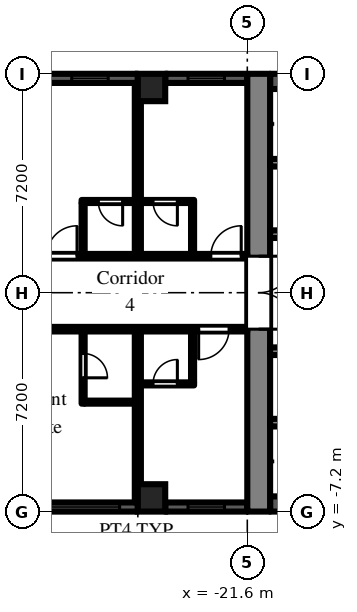
"""IFC4 building model, lengths in metres.
Left out: names, types, materials, properties, quantities, classifications, styles, units other than length and angle.
Written with IfcOpenShell. Run it as: python <this file> out.ifc"""

import sys

from ifc_helpers import new_model, si_unit, direction, frame, frame_2d, origin, origin_2d, place, context, subcontext, project, spatial, rectangle, extrude, element, fill, save


model = new_model("IFC4")
c1 = context("Model", 3, precision=1e-05, world=origin(), true_north=direction((0.0, 1.0)))
c2 = subcontext(c1, "Body", "Model", "MODEL_VIEW")
j1 = project(units=[si_unit("LENGTHUNIT", "METRE"), si_unit("PLANEANGLEUNIT", "RADIAN")], contexts=[c1])
p1 = place(None, origin())
s1 = spatial("IfcSite", under=j1, at=p1, CompositionType="ELEMENT")
p2 = place(p1, origin())
s2 = spatial("IfcBuilding", under=s1, at=p2, CompositionType="ELEMENT")
p3 = place(p2, frame((0.0, 0.0, 44.7)))
s3 = spatial("IfcBuildingStorey", under=s2, at=p3, CompositionType="ELEMENT", Elevation=44.7)
for number, where, z_axis, x_axis in (
    (1, (-24.75, -6.75, 0.0), (0.0, 0.0, 1.0), (1.0, 0.0, 0.0)),
    (2, (-24.75, 6.75, 0.0), (0.0, 0.0, 1.0), (1.0, 0.0, 0.0)),
):
    element("IfcColumn", number, at=place(p3, frame(where, z_axis=z_axis, x_axis=x_axis)), inside=s3, PredefinedType="COLUMN", context=c2, shape_type="SweptSolid", body=[
        extrude(rectangle(XDim=0.9, YDim=0.9, at=origin_2d()), origin(), (0.0, 0.0, 1.0), 3.0),
    ])
p4 = place(p3, frame((-21.6, 7.05, 0.0), z_axis=(0.0, 0.0, 1.0), x_axis=(-1.0, 0.0, 0.0)))
e3 = element("IfcWall", 3, at=p4, inside=s3, PredefinedType="SOLIDWALL", context=c2, shape_type="SweptSolid", body=[
    extrude(rectangle(XDim=2.7, YDim=0.3, at=frame_2d((1.35, 0.0))), origin(), (0.0, 0.0, 1.0), 2.1),
])
p5 = place(p4, frame((0.75, 0.0, 0.2)))
e4 = element("IfcOpeningElement", 4, at=p5, cuts=e3, PredefinedType="OPENING", context=c2, shape_type="SweptSolid", body=[
    extrude(rectangle(XDim=1.2, YDim=1.85, at=frame_2d((0.6, 0.925))), frame((0.0, 0.16, 0.0), z_axis=(0.0, -1.0, 0.0), x_axis=(1.0, 0.0, 0.0)), (0.0, 0.0, 1.0), 0.32),
])
p6 = place(p3, frame((-25.2, 7.05, 0.0), z_axis=(0.0, 0.0, 1.0), x_axis=(-1.0, 0.0, 0.0)))
e5 = element("IfcWall", 5, at=p6, inside=s3, PredefinedType="SOLIDWALL", context=c2, shape_type="SweptSolid", body=[
    extrude(rectangle(XDim=3.15, YDim=0.3, at=frame_2d((1.575, 0.0))), origin(), (0.0, 0.0, 1.0), 2.1),
])
p7 = place(p6, frame((0.975, 0.0, 0.2)))
e6 = element("IfcOpeningElement", 6, at=p7, cuts=e5, PredefinedType="OPENING", context=c2, shape_type="SweptSolid", body=[
    extrude(rectangle(XDim=1.2, YDim=1.85, at=frame_2d((0.6, 0.925))), frame((0.0, 0.16, 0.0), z_axis=(0.0, -1.0, 0.0), x_axis=(1.0, 0.0, 0.0)), (0.0, 0.0, 1.0), 0.32),
])
p8 = place(p3, frame((-28.35, -7.05, 0.0), z_axis=(0.0, 0.0, 1.0), x_axis=(1.0, 0.0, 0.0)))
e7 = element("IfcWall", 7, at=p8, inside=s3, PredefinedType="SOLIDWALL", context=c2, shape_type="SweptSolid", body=[
    extrude(rectangle(XDim=3.15, YDim=0.3, at=frame_2d((1.575, 0.0))), origin(), (0.0, 0.0, 1.0), 2.1),
])
p9 = place(p8, frame((0.15, 0.0, 0.2)))
e8 = element("IfcOpeningElement", 8, at=p9, cuts=e7, PredefinedType="OPENING", context=c2, shape_type="SweptSolid", body=[
    extrude(rectangle(XDim=2.4, YDim=1.85, at=frame_2d((1.2, 0.925))), frame((0.0, 0.16, 0.0), z_axis=(0.0, -1.0, 0.0), x_axis=(1.0, 0.0, 0.0)), (0.0, 0.0, 1.0), 0.32),
])
p10 = place(p3, frame((-24.3, -7.05, 0.0), z_axis=(0.0, 0.0, 1.0), x_axis=(1.0, 0.0, 0.0)))
e9 = element("IfcWall", 9, at=p10, inside=s3, PredefinedType="SOLIDWALL", context=c2, shape_type="SweptSolid", body=[
    extrude(rectangle(XDim=2.7, YDim=0.3, at=frame_2d((1.35, 0.0))), origin(), (0.0, 0.0, 1.0), 2.1),
])
p11 = place(p10, frame((0.75, 0.0, 0.2)))
e10 = element("IfcOpeningElement", 10, at=p11, cuts=e9, PredefinedType="OPENING", context=c2, shape_type="SweptSolid", body=[
    extrude(rectangle(XDim=1.2, YDim=1.85, at=frame_2d((0.6, 0.925))), frame((0.0, 0.16, 0.0), z_axis=(0.0, -1.0, 0.0), x_axis=(1.0, 0.0, 0.0)), (0.0, 0.0, 1.0), 0.32),
])
p12 = place(p3, frame((-21.225, -7.2, 0.0), z_axis=(0.0, 0.0, 1.0), x_axis=(0.0, 1.0, 0.0)))
e11 = element("IfcWall", 11, at=p12, inside=s3, PredefinedType="SHEAR", context=c2, shape_type="SweptSolid", body=[
    extrude(rectangle(XDim=14.4, YDim=0.75, at=frame_2d((7.2, 0.0))), origin(), (0.0, 0.0, 1.0), 2.575),
])
p13 = place(p12, frame((6.0, 0.0, 0.0)))
e12 = element("IfcOpeningElement", 12, at=p13, cuts=e11, PredefinedType="OPENING", context=c2, shape_type="SweptSolid", body=[
    extrude(rectangle(XDim=2.4, YDim=2.2, at=frame_2d((1.2, 1.1))), frame((0.0, 0.385, 0.0), z_axis=(0.0, -1.0, 0.0), x_axis=(1.0, 0.0, 0.0)), (0.0, 0.0, 1.0), 0.77),
])
p14 = place(p3, frame((-7.9, 6.95, 0.0), z_axis=(0.0, 0.0, 1.0), x_axis=(-1.0, 0.0, 0.0)))
e13 = element("IfcWall", 13, at=p14, inside=s3, PredefinedType="SHEAR", context=c2, shape_type="SweptSolid", body=[
    extrude(rectangle(XDim=12.95, YDim=0.5, at=frame_2d((6.475, 0.0))), origin(), (0.0, 0.0, 1.0), 2.575),
])
p15 = place(p3, frame((-7.9, 1.925, 0.0), z_axis=(0.0, 0.0, 1.0), x_axis=(-1.0, 0.0, 0.0)))
e14 = element("IfcWall", 14, at=p15, inside=s3, PredefinedType="SHEAR", context=c2, shape_type="SweptSolid", body=[
    extrude(rectangle(XDim=12.95, YDim=0.25, at=frame_2d((6.475, 0.0))), origin(), (0.0, 0.0, 1.0), 2.575),
])
p16 = place(p15, frame((0.525, 0.0, 0.0)))
e15 = element("IfcOpeningElement", 15, at=p16, cuts=e14, PredefinedType="OPENING", context=c2, shape_type="SweptSolid", body=[
    extrude(rectangle(XDim=0.9, YDim=2.1, at=frame_2d((0.45, 1.05))), frame((0.0, 0.135, 0.0), z_axis=(0.0, -1.0, 0.0), x_axis=(1.0, 0.0, 0.0)), (0.0, 0.0, 1.0), 0.27),
])
p17 = place(p15, frame((2.625, 0.0, 0.0)))
e16 = element("IfcOpeningElement", 16, at=p17, cuts=e14, PredefinedType="OPENING", context=c2, shape_type="SweptSolid", body=[
    extrude(rectangle(XDim=1.1, YDim=2.1, at=frame_2d((0.55, 1.05))), frame((0.0, 0.135, 0.0), z_axis=(0.0, -1.0, 0.0), x_axis=(1.0, 0.0, 0.0)), (0.0, 0.0, 1.0), 0.27),
])
p18 = place(p15, frame((4.925, 0.0, 0.0)))
e17 = element("IfcOpeningElement", 17, at=p18, cuts=e14, PredefinedType="OPENING", context=c2, shape_type="SweptSolid", body=[
    extrude(rectangle(XDim=0.9, YDim=2.1, at=frame_2d((0.45, 1.05))), frame((0.0, 0.135, 0.0), z_axis=(0.0, -1.0, 0.0), x_axis=(1.0, 0.0, 0.0)), (0.0, 0.0, 1.0), 0.27),
])
p19 = place(p15, frame((8.225, 0.0, 0.0)))
e18 = element("IfcOpeningElement", 18, at=p19, cuts=e14, PredefinedType="OPENING", context=c2, shape_type="SweptSolid", body=[
    extrude(rectangle(XDim=0.9, YDim=2.1, at=frame_2d((0.45, 1.05))), frame((0.0, 0.135, 0.0), z_axis=(0.0, -1.0, 0.0), x_axis=(1.0, 0.0, 0.0)), (0.0, 0.0, 1.0), 0.27),
])
p20 = place(p3, frame((-12.3, 4.275, 0.0), z_axis=(0.0, 0.0, 1.0), x_axis=(-1.0, 0.0, 0.0)))
e19 = element("IfcWall", 19, at=p20, inside=s3, PredefinedType="SHEAR", context=c2, shape_type="SweptSolid", body=[
    extrude(rectangle(XDim=8.55, YDim=0.25, at=frame_2d((4.275, 0.0))), origin(), (0.0, 0.0, 1.0), 2.575),
])
p21 = place(p3, frame((-7.9, -6.95, 0.0), z_axis=(0.0, 0.0, 1.0), x_axis=(-1.0, 0.0, 0.0)))
e20 = element("IfcWall", 20, at=p21, inside=s3, PredefinedType="SHEAR", context=c2, shape_type="SweptSolid", body=[
    extrude(rectangle(XDim=12.95, YDim=0.5, at=frame_2d((6.475, 0.0))), origin(), (0.0, 0.0, 1.0), 2.575),
])
p22 = place(p3, frame((-7.9, -1.925, 0.0), z_axis=(0.0, 0.0, 1.0), x_axis=(-1.0, 0.0, 0.0)))
e21 = element("IfcWall", 21, at=p22, inside=s3, PredefinedType="SHEAR", context=c2, shape_type="SweptSolid", body=[
    extrude(rectangle(XDim=12.95, YDim=0.25, at=frame_2d((6.475, 0.0))), origin(), (0.0, 0.0, 1.0), 2.575),
])
p23 = place(p22, frame((4.825, 0.0, 0.0)))
e22 = element("IfcOpeningElement", 22, at=p23, cuts=e21, PredefinedType="OPENING", context=c2, shape_type="SweptSolid", body=[
    extrude(rectangle(XDim=1.1, YDim=2.1, at=frame_2d((0.55, 1.05))), frame((0.0, 0.135, 0.0), z_axis=(0.0, -1.0, 0.0), x_axis=(1.0, 0.0, 0.0)), (0.0, 0.0, 1.0), 0.27),
])
p24 = place(p22, frame((7.025, 0.0, 0.0)))
e23 = element("IfcOpeningElement", 23, at=p24, cuts=e21, PredefinedType="OPENING", context=c2, shape_type="SweptSolid", body=[
    extrude(rectangle(XDim=1.1, YDim=2.1, at=frame_2d((0.55, 1.05))), frame((0.0, 0.135, 0.0), z_axis=(0.0, -1.0, 0.0), x_axis=(1.0, 0.0, 0.0)), (0.0, 0.0, 1.0), 0.27),
])
p25 = place(p22, frame((9.225, 0.0, 0.0)))
e24 = element("IfcOpeningElement", 24, at=p25, cuts=e21, PredefinedType="OPENING", context=c2, shape_type="SweptSolid", body=[
    extrude(rectangle(XDim=1.1, YDim=2.1, at=frame_2d((0.55, 1.05))), frame((0.0, 0.135, 0.0), z_axis=(0.0, -1.0, 0.0), x_axis=(1.0, 0.0, 0.0)), (0.0, 0.0, 1.0), 0.27),
])
p26 = place(p22, frame((0.525, 0.0, 0.0)))
e25 = element("IfcOpeningElement", 25, at=p26, cuts=e21, PredefinedType="OPENING", context=c2, shape_type="SweptSolid", body=[
    extrude(rectangle(XDim=0.9, YDim=2.1, at=frame_2d((0.45, 1.05))), frame((0.0, 0.135, 0.0), z_axis=(0.0, -1.0, 0.0), x_axis=(1.0, 0.0, 0.0)), (0.0, 0.0, 1.0), 0.27),
])
p27 = place(p22, frame((2.625, 0.0, 0.0)))
e26 = element("IfcOpeningElement", 26, at=p27, cuts=e21, PredefinedType="OPENING", context=c2, shape_type="SweptSolid", body=[
    extrude(rectangle(XDim=1.1, YDim=2.1, at=frame_2d((0.55, 1.05))), frame((0.0, 0.135, 0.0), z_axis=(0.0, -1.0, 0.0), x_axis=(1.0, 0.0, 0.0)), (0.0, 0.0, 1.0), 0.27),
])
p28 = place(p3, frame((-12.3, -4.275, 0.0), z_axis=(0.0, 0.0, 1.0), x_axis=(-1.0, 0.0, 0.0)))
e27 = element("IfcWall", 27, at=p28, inside=s3, PredefinedType="SHEAR", context=c2, shape_type="SweptSolid", body=[
    extrude(rectangle(XDim=8.55, YDim=0.25, at=frame_2d((4.275, 0.0))), origin(), (0.0, 0.0, 1.0), 2.575),
])
p29 = place(p3, frame((-36.5, -1.2, 0.0), z_axis=(0.0, 0.0, 1.0), x_axis=(1.0, 0.0, 0.0)))
e28 = element("IfcWall", 28, at=p29, inside=s3, PredefinedType="PARTITIONING", context=c2, shape_type="SweptSolid", body=[
    extrude(rectangle(XDim=14.9, YDim=0.15, at=frame_2d((7.45, 0.0))), origin(), (0.0, 0.0, 1.0), 2.575),
])
p30 = place(p29, frame((13.3, 0.0, 0.0)))
e29 = element("IfcOpeningElement", 29, at=p30, cuts=e28, PredefinedType="OPENING", context=c2, shape_type="SweptSolid", body=[
    extrude(rectangle(XDim=1.0, YDim=2.1, at=frame_2d((0.5, 1.05))), frame((0.0, 0.085, 0.0), z_axis=(0.0, -1.0, 0.0), x_axis=(1.0, 0.0, 0.0)), (0.0, 0.0, 1.0), 0.17),
])
p31 = place(p29, frame((4.41, 0.0, 0.0)))
e30 = element("IfcOpeningElement", 30, at=p31, cuts=e28, PredefinedType="OPENING", context=c2, shape_type="SweptSolid", body=[
    extrude(rectangle(XDim=1.0, YDim=2.1, at=frame_2d((0.5, 1.05))), frame((0.0, 0.085, 0.0), z_axis=(0.0, -1.0, 0.0), x_axis=(1.0, 0.0, 0.0)), (0.0, 0.0, 1.0), 0.17),
])
p32 = place(p29, frame((1.15, 0.0, 0.0)))
e31 = element("IfcOpeningElement", 31, at=p32, cuts=e28, PredefinedType="OPENING", context=c2, shape_type="SweptSolid", body=[
    extrude(rectangle(XDim=1.8, YDim=2.1, at=frame_2d((0.9, 1.05))), frame((0.0, 0.085, 0.0), z_axis=(0.0, -1.0, 0.0), x_axis=(1.0, 0.0, 0.0)), (0.0, 0.0, 1.0), 0.17),
])
p33 = place(p3, frame((-36.5, 1.2, 0.0), z_axis=(0.0, 0.0, 1.0), x_axis=(1.0, 0.0, 0.0)))
e32 = element("IfcWall", 32, at=p33, inside=s3, PredefinedType="PARTITIONING", context=c2, shape_type="SweptSolid", body=[
    extrude(rectangle(XDim=14.9, YDim=0.15, at=frame_2d((7.45, 0.0))), origin(), (0.0, 0.0, 1.0), 2.575),
])
p34 = place(p33, frame((13.7, 0.0, 0.0)))
e33 = element("IfcOpeningElement", 33, at=p34, cuts=e32, PredefinedType="OPENING", context=c2, shape_type="SweptSolid", body=[
    extrude(rectangle(XDim=1.0, YDim=2.1, at=frame_2d((0.5, 1.05))), frame((0.0, 0.085, 0.0), z_axis=(0.0, -1.0, 0.0), x_axis=(1.0, 0.0, 0.0)), (0.0, 0.0, 1.0), 0.17),
])
p35 = place(p33, frame((8.3, 0.0, 0.0)))
e34 = element("IfcOpeningElement", 34, at=p35, cuts=e32, PredefinedType="OPENING", context=c2, shape_type="SweptSolid", body=[
    extrude(rectangle(XDim=1.0, YDim=2.1, at=frame_2d((0.5, 1.05))), frame((0.0, 0.085, 0.0), z_axis=(0.0, -1.0, 0.0), x_axis=(1.0, 0.0, 0.0)), (0.0, 0.0, 1.0), 0.17),
])
p36 = place(p33, frame((6.35, 0.0, 0.0)))
e35 = element("IfcOpeningElement", 35, at=p36, cuts=e32, PredefinedType="OPENING", context=c2, shape_type="SweptSolid", body=[
    extrude(rectangle(XDim=0.9, YDim=2.1, at=frame_2d((0.45, 1.05))), frame((0.0, 0.085, 0.0), z_axis=(0.0, -1.0, 0.0), x_axis=(1.0, 0.0, 0.0)), (0.0, 0.0, 1.0), 0.17),
])
p37 = place(p33, frame((4.55, 0.0, 0.0)))
e36 = element("IfcOpeningElement", 36, at=p37, cuts=e32, PredefinedType="OPENING", context=c2, shape_type="SweptSolid", body=[
    extrude(rectangle(XDim=0.9, YDim=2.1, at=frame_2d((0.45, 1.05))), frame((0.0, 0.085, 0.0), z_axis=(0.0, -1.0, 0.0), x_axis=(1.0, 0.0, 0.0)), (0.0, 0.0, 1.0), 0.17),
])
p38 = place(p33, frame((1.15, 0.0, 0.0)))
e37 = element("IfcOpeningElement", 37, at=p38, cuts=e32, PredefinedType="OPENING", context=c2, shape_type="SweptSolid", body=[
    extrude(rectangle(XDim=1.8, YDim=2.1, at=frame_2d((0.9, 1.05))), frame((0.0, 0.085, 0.0), z_axis=(0.0, -1.0, 0.0), x_axis=(1.0, 0.0, 0.0)), (0.0, 0.0, 1.0), 0.17),
])
p39 = place(p3, frame((-27.0, -3.65, 0.0), z_axis=(0.0, 0.0, 1.0), x_axis=(0.0, 1.0, 0.0)))
e38 = element("IfcWall", 38, at=p39, inside=s3, PredefinedType="PARTITIONING", context=c2, shape_type="SweptSolid", body=[
    extrude(rectangle(XDim=2.375, YDim=0.1, at=frame_2d((1.188, 0.0))), origin(), (0.0, 0.0, 1.0), 2.575),
])
p40 = place(p39, frame((0.85, 0.0, 0.0)))
e39 = element("IfcOpeningElement", 39, at=p40, cuts=e38, PredefinedType="OPENING", context=c2, shape_type="SweptSolid", body=[
    extrude(rectangle(XDim=0.8, YDim=2.1, at=frame_2d((0.4, 1.05))), frame((0.0, 0.06, 0.0), z_axis=(0.0, -1.0, 0.0), x_axis=(1.0, 0.0, 0.0)), (0.0, 0.0, 1.0), 0.12),
])
p41 = place(p3, frame((-26.95, -3.6, 0.0), z_axis=(0.0, 0.0, 1.0), x_axis=(1.0, 0.0, 0.0)))
e40 = element("IfcWall", 40, at=p41, inside=s3, PredefinedType="PARTITIONING", context=c2, shape_type="SweptSolid", body=[
    extrude(rectangle(XDim=1.65, YDim=0.1, at=frame_2d((0.825, 0.0))), origin(), (0.0, 0.0, 1.0), 2.575),
])
p42 = place(p3, frame((-27.0, 1.275, 0.0), z_axis=(0.0, 0.0, 1.0), x_axis=(0.0, 1.0, 0.0)))
e41 = element("IfcWall", 41, at=p42, inside=s3, PredefinedType="PARTITIONING", context=c2, shape_type="SweptSolid", body=[
    extrude(rectangle(XDim=1.675, YDim=0.1, at=frame_2d((0.837, 0.0))), origin(), (0.0, 0.0, 1.0), 2.575),
])
p43 = place(p3, frame((-27.05, 3.0, 0.0), z_axis=(0.0, 0.0, 1.0), x_axis=(1.0, 0.0, 0.0)))
e42 = element("IfcWall", 42, at=p43, inside=s3, PredefinedType="PARTITIONING", context=c2, shape_type="SweptSolid", body=[
    extrude(rectangle(XDim=3.7, YDim=0.1, at=frame_2d((1.85, 0.0))), origin(), (0.0, 0.0, 1.0), 2.575),
])
p44 = place(p43, frame((2.35, 0.0, 0.0)))
e43 = element("IfcOpeningElement", 43, at=p44, cuts=e42, PredefinedType="OPENING", context=c2, shape_type="SweptSolid", body=[
    extrude(rectangle(XDim=0.8, YDim=2.1, at=frame_2d((0.4, 1.05))), frame((0.0, 0.06, 0.0), z_axis=(0.0, -1.0, 0.0), x_axis=(1.0, 0.0, 0.0)), (0.0, 0.0, 1.0), 0.12),
])
p45 = place(p43, frame((0.55, 0.0, 0.0)))
e44 = element("IfcOpeningElement", 44, at=p45, cuts=e42, PredefinedType="OPENING", context=c2, shape_type="SweptSolid", body=[
    extrude(rectangle(XDim=0.8, YDim=2.1, at=frame_2d((0.4, 1.05))), frame((0.0, 0.06, 0.0), z_axis=(0.0, -1.0, 0.0), x_axis=(1.0, 0.0, 0.0)), (0.0, 0.0, 1.0), 0.12),
])
p46 = place(p3, frame((-25.2, -6.9, 0.0), z_axis=(0.0, 0.0, 1.0), x_axis=(0.0, 1.0, 0.0)))
e45 = element("IfcWall", 45, at=p46, inside=s3, PredefinedType="PARTITIONING", context=c2, shape_type="SweptSolid", body=[
    extrude(rectangle(XDim=5.625, YDim=0.2, at=frame_2d((2.812, 0.0))), origin(), (0.0, 0.0, 1.0), 2.575),
])
p47 = place(p3, frame((-25.1, -3.0, 0.0), z_axis=(0.0, 0.0, 1.0), x_axis=(1.0, 0.0, 0.0)))
e46 = element("IfcWall", 46, at=p47, inside=s3, PredefinedType="PARTITIONING", context=c2, shape_type="SweptSolid", body=[
    extrude(rectangle(XDim=1.75, YDim=0.1, at=frame_2d((0.875, 0.0))), origin(), (0.0, 0.0, 1.0), 2.575),
])
p48 = place(p47, frame((0.4, 0.0, 0.0)))
e47 = element("IfcOpeningElement", 47, at=p48, cuts=e46, PredefinedType="OPENING", context=c2, shape_type="SweptSolid", body=[
    extrude(rectangle(XDim=0.8, YDim=2.1, at=frame_2d((0.4, 1.05))), frame((0.0, 0.06, 0.0), z_axis=(0.0, -1.0, 0.0), x_axis=(1.0, 0.0, 0.0)), (0.0, 0.0, 1.0), 0.12),
])
p49 = place(p3, frame((-25.2, 1.275, 0.0), z_axis=(0.0, 0.0, 1.0), x_axis=(0.0, 1.0, 0.0)))
e48 = element("IfcWall", 48, at=p49, inside=s3, PredefinedType="PARTITIONING", context=c2, shape_type="SweptSolid", body=[
    extrude(rectangle(XDim=5.625, YDim=0.2, at=frame_2d((2.812, 0.0))), origin(), (0.0, 0.0, 1.0), 2.575),
])
for number, where, z_axis, x_axis in (
    (49, (-23.4, -2.95, 0.0), (0.0, 0.0, 1.0), (0.0, 1.0, 0.0)),
    (50, (-23.4, 1.275, 0.0), (0.0, 0.0, 1.0), (0.0, 1.0, 0.0)),
):
    element("IfcWall", number, at=place(p3, frame(where, z_axis=z_axis, x_axis=x_axis)), inside=s3, PredefinedType="PARTITIONING", context=c2, shape_type="SweptSolid", body=[
        extrude(rectangle(XDim=1.675, YDim=0.1, at=frame_2d((0.837, 0.0))), origin(), (0.0, 0.0, 1.0), 2.575),
    ])
p50 = place(p5, origin())
e51 = element("IfcWindow", 51, at=p50, inside=s3, PartitioningType="SINGLE_PANEL", PredefinedType="WINDOW", context=c2, shape_type="SweptSolid", body=[
    extrude(rectangle(XDim=1.2, YDim=1.85, at=frame_2d((0.6, 0.925))), frame((0.0, 0.03, 0.0), z_axis=(0.0, -1.0, 0.0), x_axis=(1.0, 0.0, 0.0)), (0.0, 0.0, 1.0), 0.06),
])
fill(e4, e51)
p51 = place(p7, origin())
e52 = element("IfcWindow", 52, at=p51, inside=s3, PartitioningType="SINGLE_PANEL", PredefinedType="WINDOW", context=c2, shape_type="SweptSolid", body=[
    extrude(rectangle(XDim=1.2, YDim=1.85, at=frame_2d((0.6, 0.925))), frame((0.0, 0.03, 0.0), z_axis=(0.0, -1.0, 0.0), x_axis=(1.0, 0.0, 0.0)), (0.0, 0.0, 1.0), 0.06),
])
fill(e6, e52)
p52 = place(p9, origin())
e53 = element("IfcWindow", 53, at=p52, inside=s3, PartitioningType="SINGLE_PANEL", PredefinedType="WINDOW", context=c2, shape_type="SweptSolid", body=[
    extrude(rectangle(XDim=2.4, YDim=1.85, at=frame_2d((1.2, 0.925))), frame((0.0, 0.03, 0.0), z_axis=(0.0, -1.0, 0.0), x_axis=(1.0, 0.0, 0.0)), (0.0, 0.0, 1.0), 0.06),
])
fill(e8, e53)
p53 = place(p11, origin())
e54 = element("IfcWindow", 54, at=p53, inside=s3, PartitioningType="SINGLE_PANEL", PredefinedType="WINDOW", context=c2, shape_type="SweptSolid", body=[
    extrude(rectangle(XDim=1.2, YDim=1.85, at=frame_2d((0.6, 0.925))), frame((0.0, 0.03, 0.0), z_axis=(0.0, -1.0, 0.0), x_axis=(1.0, 0.0, 0.0)), (0.0, 0.0, 1.0), 0.06),
])
fill(e10, e54)
p54 = place(p13, frame((2.4, 0.0, 0.0), z_axis=(0.0, 0.0, 1.0), x_axis=(-1.0, 0.0, 0.0)))
e55 = element("IfcDoor", 55, at=p54, inside=s3, OperationType="DOUBLE_DOOR_DOUBLE_SWING", PredefinedType="DOOR", context=c2, shape_type="SweptSolid", body=[
    extrude(rectangle(XDim=2.4, YDim=2.2, at=frame_2d((1.2, 1.1))), frame((0.0, 0.025, 0.0), z_axis=(0.0, -1.0, 0.0), x_axis=(1.0, 0.0, 0.0)), (0.0, 0.0, 1.0), 0.05),
])
fill(e12, e55)
p55 = place(p48, origin())
e56 = element("IfcDoor", 56, at=p55, inside=s3, OperationType="SINGLE_SWING_RIGHT", PredefinedType="DOOR", context=c2, shape_type="SweptSolid", body=[
    extrude(rectangle(XDim=0.8, YDim=2.1, at=frame_2d((0.4, 1.05))), frame((0.0, 0.025, 0.0), z_axis=(0.0, -1.0, 0.0), x_axis=(1.0, 0.0, 0.0)), (0.0, 0.0, 1.0), 0.05),
])
fill(e47, e56)
p56 = place(p30, frame((1.0, 0.0, 0.0), z_axis=(0.0, 0.0, 1.0), x_axis=(-1.0, 0.0, 0.0)))
e57 = element("IfcDoor", 57, at=p56, inside=s3, OperationType="SINGLE_SWING_RIGHT", PredefinedType="DOOR", context=c2, shape_type="SweptSolid", body=[
    extrude(rectangle(XDim=1.0, YDim=2.1, at=frame_2d((0.5, 1.05))), frame((0.0, 0.025, 0.0), z_axis=(0.0, -1.0, 0.0), x_axis=(1.0, 0.0, 0.0)), (0.0, 0.0, 1.0), 0.05),
])
fill(e29, e57)
p57 = place(p40, frame((0.8, 0.0, 0.0), z_axis=(0.0, 0.0, 1.0), x_axis=(-1.0, 0.0, 0.0)))
e58 = element("IfcDoor", 58, at=p57, inside=s3, OperationType="SINGLE_SWING_RIGHT", PredefinedType="DOOR", context=c2, shape_type="SweptSolid", body=[
    extrude(rectangle(XDim=0.8, YDim=2.1, at=frame_2d((0.4, 1.05))), frame((0.0, 0.025, 0.0), z_axis=(0.0, -1.0, 0.0), x_axis=(1.0, 0.0, 0.0)), (0.0, 0.0, 1.0), 0.05),
])
fill(e39, e58)
p58 = place(p44, frame((0.8, 0.0, 0.0), z_axis=(0.0, 0.0, 1.0), x_axis=(-1.0, 0.0, 0.0)))
e59 = element("IfcDoor", 59, at=p58, inside=s3, OperationType="SINGLE_SWING_LEFT", PredefinedType="DOOR", context=c2, shape_type="SweptSolid", body=[
    extrude(rectangle(XDim=0.8, YDim=2.1, at=frame_2d((0.4, 1.05))), frame((0.0, 0.025, 0.0), z_axis=(0.0, -1.0, 0.0), x_axis=(1.0, 0.0, 0.0)), (0.0, 0.0, 1.0), 0.05),
])
fill(e43, e59)
p59 = place(p34, origin())
e60 = element("IfcDoor", 60, at=p59, inside=s3, OperationType="SINGLE_SWING_RIGHT", PredefinedType="DOOR", context=c2, shape_type="SweptSolid", body=[
    extrude(rectangle(XDim=1.0, YDim=2.1, at=frame_2d((0.5, 1.05))), frame((0.0, 0.025, 0.0), z_axis=(0.0, -1.0, 0.0), x_axis=(1.0, 0.0, 0.0)), (0.0, 0.0, 1.0), 0.05),
])
fill(e33, e60)
p60 = place(p45, frame((0.8, 0.0, 0.0), z_axis=(0.0, 0.0, 1.0), x_axis=(-1.0, 0.0, 0.0)))
e61 = element("IfcDoor", 61, at=p60, inside=s3, OperationType="SINGLE_SWING_LEFT", PredefinedType="DOOR", context=c2, shape_type="SweptSolid", body=[
    extrude(rectangle(XDim=0.8, YDim=2.1, at=frame_2d((0.4, 1.05))), frame((0.0, 0.025, 0.0), z_axis=(0.0, -1.0, 0.0), x_axis=(1.0, 0.0, 0.0)), (0.0, 0.0, 1.0), 0.05),
])
fill(e44, e61)
p61 = place(p35, origin())
e62 = element("IfcDoor", 62, at=p61, inside=s3, OperationType="SINGLE_SWING_RIGHT", PredefinedType="DOOR", context=c2, shape_type="SweptSolid", body=[
    extrude(rectangle(XDim=1.0, YDim=2.1, at=frame_2d((0.5, 1.05))), frame((0.0, 0.025, 0.0), z_axis=(0.0, -1.0, 0.0), x_axis=(1.0, 0.0, 0.0)), (0.0, 0.0, 1.0), 0.05),
])
fill(e34, e62)
save(model, sys.argv[1])
